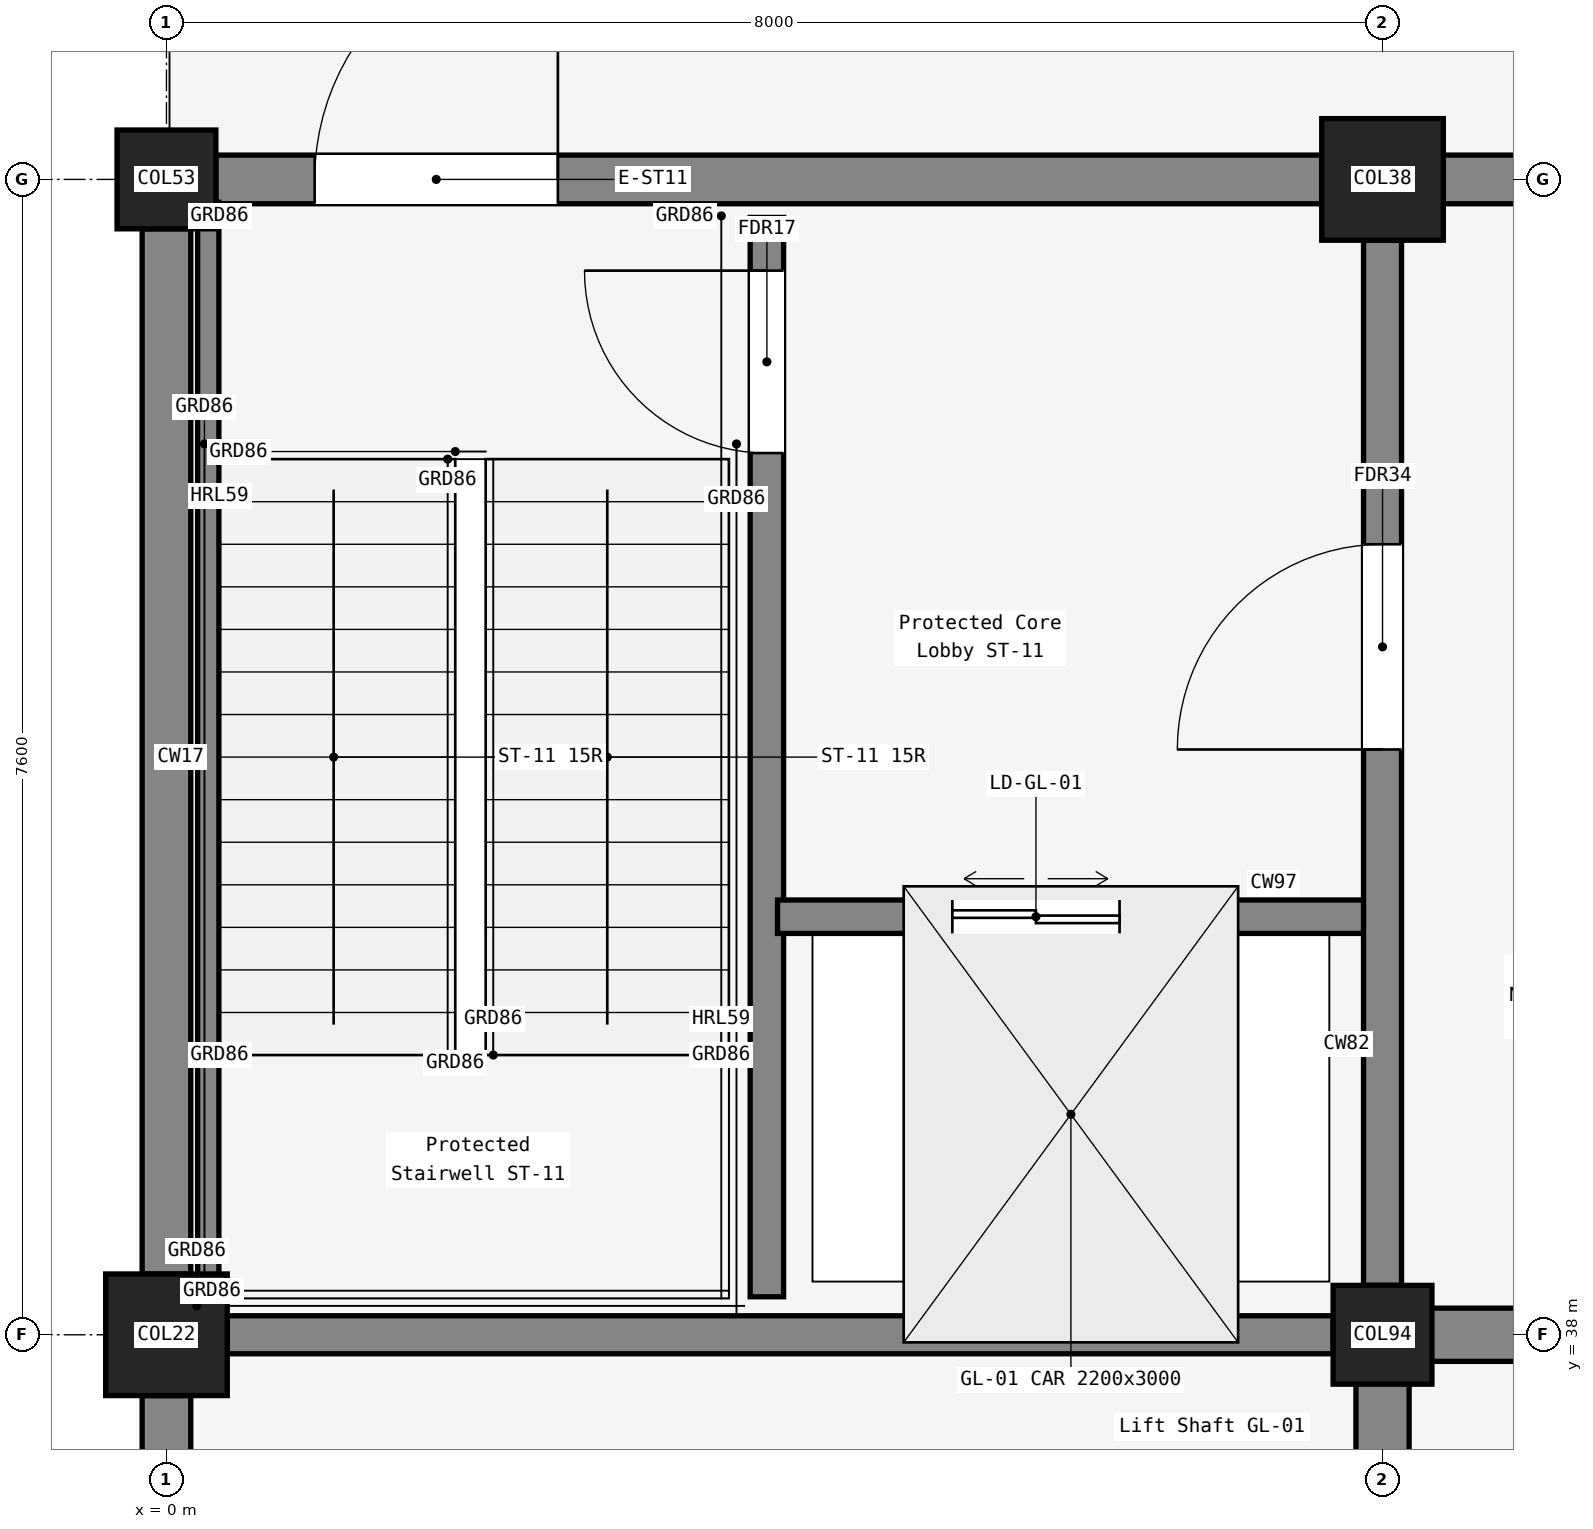
"""IFC4 building model, lengths in metres.
Left out: names, types, materials, properties, quantities, classifications, styles, units other than length and angle.
Written with IfcOpenShell. Run it as: python <this file> out.ifc"""

import sys

from ifc_helpers import new_model, si_unit, direction, frame, frame_2d, origin, origin_2d, place, context, subcontext, project, spatial, rectangle, circle, extrude, element, fill, save


model = new_model("IFC4")
c1 = context("Model", 3, precision=1e-05, world=origin(), true_north=direction((0.0, 1.0)))
c2 = subcontext(c1, "Body", "Model", "MODEL_VIEW")
j1 = project(units=[si_unit("LENGTHUNIT", "METRE"), si_unit("PLANEANGLEUNIT", "RADIAN")], contexts=[c1])
p1 = place(None, origin())
s1 = spatial("IfcSite", under=j1, at=p1, CompositionType="ELEMENT")
p2 = place(p1, origin())
s2 = spatial("IfcBuilding", under=s1, at=p2, CompositionType="ELEMENT")
p3 = place(p2, frame((0.0, 0.0, -5.4)))
s3 = spatial("IfcBuildingStorey", under=s2, at=p3, CompositionType="ELEMENT", Elevation=-5.4)
for number, where, z_axis, x_axis in (
    (1, (8.0, 45.6, 0.0), (0.0, 0.0, 1.0), (-1.0, 0.0, 0.0)),
    (2, (16.0, 45.6, 0.0), (0.0, 0.0, 1.0), (-1.0, 0.0, 0.0)),
):
    element("IfcWall", number, at=place(p3, frame(where, z_axis=z_axis, x_axis=x_axis)), inside=s3, PredefinedType="USERDEFINED", context=c2, shape_type="SweptSolid", body=[
        extrude(rectangle(XDim=8.0, YDim=0.4, at=frame_2d((4.0, 0.0))), origin(), (0.0, 0.0, 1.0), 5.08),
    ])
for number, where, z_axis, x_axis in (
    (3, (0.0, 38.0, 0.0), (0.0, 0.0, 1.0), (0.0, -1.0, 0.0)),
    (4, (0.0, 45.6, 0.0), (0.0, 0.0, 1.0), (0.0, -1.0, 0.0)),
):
    element("IfcWall", number, at=place(p3, frame(where, z_axis=z_axis, x_axis=x_axis)), inside=s3, PredefinedType="USERDEFINED", context=c2, shape_type="SweptSolid", body=[
        extrude(rectangle(XDim=7.6, YDim=0.4, at=frame_2d((3.8, 0.0))), origin(), (0.0, 0.0, 1.0), 5.08),
    ])
p4 = place(p3, frame((0.2, 45.6, -0.5), z_axis=(0.0, 0.0, 1.0), x_axis=(0.0, 1.0, 0.0)))
e5 = element("IfcWall", 5, at=p4, inside=s3, PredefinedType="USERDEFINED", context=c2, shape_type="SweptSolid", body=[
    extrude(rectangle(XDim=7.6, YDim=0.4, at=frame_2d((3.8, 0.0))), origin(), (0.0, 0.0, 1.0), 5.6),
])
p5 = place(p3, frame((0.0, 38.0, 0.0), z_axis=(0.0, 0.0, 1.0), x_axis=(1.0, 0.0, 0.0)))
e6 = element("IfcColumn", 6, at=p5, inside=s3, PredefinedType="COLUMN", context=c2, shape_type="SweptSolid", body=[
    extrude(rectangle(XDim=0.5, YDim=0.5, at=origin_2d()), origin(), (0.0, 0.0, 1.0), 5.4),
])
for number, where, z_axis, x_axis in (
    (7, (0.0, 45.6, 0.0), (0.0, 0.0, 1.0), (1.0, 0.0, 0.0)),
    (8, (8.0, 38.0, 0.0), (0.0, 0.0, 1.0), (1.0, 0.0, 0.0)),
):
    element("IfcColumn", number, at=place(p3, frame(where, z_axis=z_axis, x_axis=x_axis)), inside=s3, PredefinedType="COLUMN", context=c2, shape_type="SweptSolid", body=[
        extrude(circle(Radius=0.4, at=origin_2d()), origin(), (0.0, 0.0, 1.0), 5.4),
    ])
p6 = place(p3, frame((8.0, 45.6, 0.0), z_axis=(0.0, 0.0, 1.0), x_axis=(1.0, 0.0, 0.0)))
e9 = element("IfcColumn", 9, at=p6, inside=s3, PredefinedType="COLUMN", context=c2, shape_type="SweptSolid", body=[
    extrude(circle(Radius=0.325, at=origin_2d()), origin(), (0.0, 0.0, 1.0), 5.4),
])
p7 = place(p3, frame((8.0, 38.0, 0.0), z_axis=(0.0, 0.0, 1.0), x_axis=(1.0, 0.0, 0.0)))
e10 = element("IfcWall", 10, at=p7, inside=s3, PredefinedType="SHEAR", context=c2, shape_type="SweptSolid", body=[
    extrude(rectangle(XDim=8.0, YDim=0.35, at=frame_2d((4.0, 0.0))), origin(), (0.0, 0.0, 1.0), 5.08),
])
p8 = place(p7, frame((2.9, 0.0, 0.0)))
e11 = element("IfcOpeningElement", 11, at=p8, cuts=e10, PredefinedType="OPENING", context=c2, shape_type="SweptSolid", body=[
    extrude(rectangle(XDim=1.75, YDim=2.25, at=frame_2d((0.875, 1.125))), frame((0.0, 0.185, 0.0), z_axis=(0.0, -1.0, 0.0), x_axis=(1.0, 0.0, 0.0)), (0.0, 0.0, 1.0), 0.37),
])
p9 = place(p3, frame((8.0, 30.4, 0.0), z_axis=(0.0, 0.0, 1.0), x_axis=(0.0, 1.0, 0.0)))
e12 = element("IfcWall", 12, at=p9, inside=s3, PredefinedType="SHEAR", context=c2, shape_type="SweptSolid", body=[
    extrude(rectangle(XDim=7.6, YDim=0.35, at=frame_2d((3.8, 0.0))), origin(), (0.0, 0.0, 1.0), 5.08),
])
p10 = place(p3, frame((0.25, 38.0, 0.0), z_axis=(0.0, 0.0, 1.0), x_axis=(1.0, 0.0, 0.0)))
e13 = element("IfcWall", 13, at=p10, inside=s3, PredefinedType="SOLIDWALL", context=c2, shape_type="SweptSolid", body=[
    extrude(rectangle(XDim=7.35, YDim=0.25, at=frame_2d((3.675, 0.0))), origin(), (0.0, 0.0, 1.0), 4.255),
])
p11 = place(p3, frame((3.95, 38.25, 0.0), z_axis=(0.0, 0.0, 1.0), x_axis=(0.0, 1.0, 0.0)))
e14 = element("IfcWall", 14, at=p11, inside=s3, PredefinedType="SOLIDWALL", context=c2, shape_type="SweptSolid", body=[
    extrude(rectangle(XDim=7.1, YDim=0.22, at=frame_2d((3.55, 0.0))), origin(), (0.0, 0.0, 1.0), 5.08),
])
p12 = place(p11, frame((5.55, 0.0, 0.0)))
e15 = element("IfcOpeningElement", 15, at=p12, cuts=e14, PredefinedType="OPENING", context=c2, shape_type="SweptSolid", body=[
    extrude(rectangle(XDim=1.2, YDim=2.15, at=frame_2d((0.6, 1.075))), frame((0.0, 0.12, 0.0), z_axis=(0.0, -1.0, 0.0), x_axis=(1.0, 0.0, 0.0)), (0.0, 0.0, 1.0), 0.24),
])
p13 = place(p3, frame((4.02, 40.75, 0.0), z_axis=(0.0, 0.0, 1.0), x_axis=(1.0, 0.0, 0.0)))
e16 = element("IfcWall", 16, at=p13, inside=s3, PredefinedType="SOLIDWALL", context=c2, shape_type="SweptSolid", body=[
    extrude(rectangle(XDim=3.93, YDim=0.22, at=frame_2d((1.965, 0.0))), origin(), (0.0, 0.0, 1.0), 4.43),
])
p14 = place(p13, frame((1.15, 0.0, 0.0)))
e17 = element("IfcOpeningElement", 17, at=p14, cuts=e16, PredefinedType="OPENING", context=c2, shape_type="SweptSolid", body=[
    extrude(rectangle(XDim=1.1, YDim=2.2, at=frame_2d((0.55, 1.1))), frame((0.0, 0.12, 0.0), z_axis=(0.0, -1.0, 0.0), x_axis=(1.0, 0.0, 0.0)), (0.0, 0.0, 1.0), 0.24),
])
p15 = place(p3, frame((8.0, 38.4, 0.0), z_axis=(0.0, 0.0, 1.0), x_axis=(0.0, 1.0, 0.0)))
e18 = element("IfcWall", 18, at=p15, inside=s3, PredefinedType="SOLIDWALL", context=c2, shape_type="SweptSolid", body=[
    extrude(rectangle(XDim=6.875, YDim=0.25, at=frame_2d((3.438, 0.0))), origin(), (0.0, 0.0, 1.0), 4.255),
])
p16 = place(p15, frame((3.45, 0.0, 0.0)))
e19 = element("IfcOpeningElement", 19, at=p16, cuts=e18, PredefinedType="OPENING", context=c2, shape_type="SweptSolid", body=[
    extrude(rectangle(XDim=1.35, YDim=2.2, at=frame_2d((0.675, 1.1))), frame((0.0, 0.135, 0.0), z_axis=(0.0, -1.0, 0.0), x_axis=(1.0, 0.0, 0.0)), (0.0, 0.0, 1.0), 0.27),
])
p17 = place(p3, frame((0.275, 38.15, 0.0), z_axis=(0.0, 0.0, 1.0), x_axis=(0.0, 1.0, 0.0)))
e20 = element("IfcWall", 20, at=p17, inside=s3, PredefinedType="SOLIDWALL", context=c2, shape_type="SweptSolid", body=[
    extrude(rectangle(XDim=7.3, YDim=0.14, at=frame_2d((3.65, 0.0))), origin(), (0.0, 0.0, 1.0), 5.08),
])
p18 = place(p12, origin())
e21 = element("IfcDoor", 21, at=p18, inside=s3, OperationType="SINGLE_SWING_RIGHT", PredefinedType="DOOR", context=c2, shape_type="SweptSolid", body=[
    extrude(rectangle(XDim=1.2, YDim=2.15, at=frame_2d((0.6, 1.075))), frame((0.0, 0.025, 0.0), z_axis=(0.0, -1.0, 0.0), x_axis=(1.0, 0.0, 0.0)), (0.0, 0.0, 1.0), 0.05),
])
fill(e15, e21)
p19 = place(p14, origin())
e22 = element("IfcDoor", 22, at=p19, inside=s3, OperationType="DOUBLE_DOOR_SLIDING", PredefinedType="DOOR", context=c2, shape_type="SweptSolid", body=[
    extrude(rectangle(XDim=1.1, YDim=2.2, at=frame_2d((0.55, 1.1))), frame((0.0, 0.025, 0.0), z_axis=(0.0, -1.0, 0.0), x_axis=(1.0, 0.0, 0.0)), (0.0, 0.0, 1.0), 0.05),
])
fill(e17, e22)
p20 = place(p16, origin())
e23 = element("IfcDoor", 23, at=p20, inside=s3, OperationType="SINGLE_SWING_LEFT", PredefinedType="DOOR", context=c2, shape_type="SweptSolid", body=[
    extrude(rectangle(XDim=1.35, YDim=2.2, at=frame_2d((0.675, 1.1))), frame((0.0, 0.025, 0.0), z_axis=(0.0, -1.0, 0.0), x_axis=(1.0, 0.0, 0.0)), (0.0, 0.0, 1.0), 0.05),
])
fill(e19, e23)
save(model, sys.argv[1])
